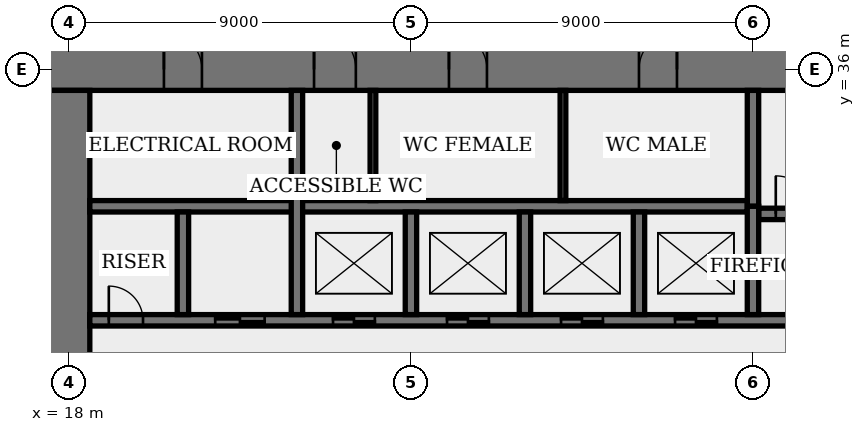
"""IFC4 building model, lengths in metres.
Left out: names, types, materials, properties, quantities, classifications, styles, units other than length and angle.
Written with IfcOpenShell. Run it as: python <this file> out.ifc"""

import sys

from ifc_helpers import new_model, si_unit, direction, frame, frame_2d, origin, place, context, subcontext, project, spatial, rectangle, extrude, element, fill, save


model = new_model("IFC4")
c1 = context("Model", 3, precision=1e-05, world=origin(), true_north=direction((0.0, 1.0)))
c2 = subcontext(c1, "Body", "Model", "MODEL_VIEW")
j1 = project(units=[si_unit("LENGTHUNIT", "METRE"), si_unit("PLANEANGLEUNIT", "RADIAN")], contexts=[c1])
p1 = place(None, origin())
s1 = spatial("IfcSite", under=j1, at=p1, CompositionType="ELEMENT")
p2 = place(p1, origin())
s2 = spatial("IfcBuilding", under=s1, at=p2, CompositionType="ELEMENT")
p3 = place(p2, origin())
s3 = spatial("IfcBuildingStorey", under=s2, at=p3, CompositionType="ELEMENT", Elevation=0.0)
p4 = place(p3, frame((45.55, 36.0, 0.0), z_axis=(0.0, 0.0, 1.0), x_axis=(-1.0, 0.0, 0.0)))
e1 = element("IfcWall", 1, at=p4, inside=s3, PredefinedType="SHEAR", context=c2, shape_type="SweptSolid", body=[
    extrude(rectangle(XDim=28.1, YDim=1.1, at=frame_2d((14.05, 0.0))), origin(), (0.0, 0.0, 1.0), 5.4),
])
p5 = place(p4, frame((11.55, 0.0, 0.0)))
e2 = element("IfcOpeningElement", 2, at=p5, cuts=e1, PredefinedType="OPENING", context=c2, shape_type="SweptSolid", body=[
    extrude(rectangle(XDim=1.0, YDim=2.4, at=frame_2d((0.5, 1.2))), frame((0.0, 0.56, 0.0), z_axis=(0.0, -1.0, 0.0), x_axis=(1.0, 0.0, 0.0)), (0.0, 0.0, 1.0), 1.12),
])
p6 = place(p4, frame((16.55, 0.0, 0.0)))
e3 = element("IfcOpeningElement", 3, at=p6, cuts=e1, PredefinedType="OPENING", context=c2, shape_type="SweptSolid", body=[
    extrude(rectangle(XDim=1.0, YDim=2.4, at=frame_2d((0.5, 1.2))), frame((0.0, 0.56, 0.0), z_axis=(0.0, -1.0, 0.0), x_axis=(1.0, 0.0, 0.0)), (0.0, 0.0, 1.0), 1.12),
])
p7 = place(p4, frame((20.0, 0.0, 0.0)))
e4 = element("IfcOpeningElement", 4, at=p7, cuts=e1, PredefinedType="OPENING", context=c2, shape_type="SweptSolid", body=[
    extrude(rectangle(XDim=1.1, YDim=2.4, at=frame_2d((0.55, 1.2))), frame((0.0, 0.56, 0.0), z_axis=(0.0, -1.0, 0.0), x_axis=(1.0, 0.0, 0.0)), (0.0, 0.0, 1.0), 1.12),
])
p8 = place(p4, frame((24.05, 0.0, 0.0)))
e5 = element("IfcOpeningElement", 5, at=p8, cuts=e1, PredefinedType="OPENING", context=c2, shape_type="SweptSolid", body=[
    extrude(rectangle(XDim=1.0, YDim=2.4, at=frame_2d((0.5, 1.2))), frame((0.0, 0.56, 0.0), z_axis=(0.0, -1.0, 0.0), x_axis=(1.0, 0.0, 0.0)), (0.0, 0.0, 1.0), 1.12),
])
p9 = place(p3, frame((18.0, 35.45, 0.0), z_axis=(0.0, 0.0, 1.0), x_axis=(0.0, -1.0, 0.0)))
e6 = element("IfcWall", 6, at=p9, inside=s3, PredefinedType="SHEAR", context=c2, shape_type="SweptSolid", body=[
    extrude(rectangle(XDim=16.9, YDim=1.1, at=frame_2d((8.45, 0.0))), origin(), (0.0, 0.0, 1.0), 5.4),
])
p10 = place(p9, frame((8.45, 0.0, 0.0)))
e7 = element("IfcOpeningElement", 7, at=p10, cuts=e6, PredefinedType="OPENING", context=c2, shape_type="SweptSolid", body=[
    extrude(rectangle(XDim=1.8, YDim=2.4, at=frame_2d((0.9, 1.2))), frame((0.0, 0.56, 0.0), z_axis=(0.0, -1.0, 0.0), x_axis=(1.0, 0.0, 0.0)), (0.0, 0.0, 1.0), 1.12),
])
p11 = place(p3, frame((36.15, 32.2, 0.0), z_axis=(0.0, 0.0, 1.0), x_axis=(1.0, 0.0, 0.0)))
e8 = element("IfcWall", 8, at=p11, inside=s3, PredefinedType="SHEAR", context=c2, shape_type="SweptSolid", body=[
    extrude(rectangle(XDim=8.3, YDim=0.3, at=frame_2d((4.15, 0.0))), origin(), (0.0, 0.0, 1.0), 5.4),
])
p12 = place(p11, frame((0.45, 0.0, 0.0)))
e9 = element("IfcOpeningElement", 9, at=p12, cuts=e8, PredefinedType="OPENING", context=c2, shape_type="SweptSolid", body=[
    extrude(rectangle(XDim=1.0, YDim=2.4, at=frame_2d((0.5, 1.2))), frame((0.0, 0.16, 0.0), z_axis=(0.0, -1.0, 0.0), x_axis=(1.0, 0.0, 0.0)), (0.0, 0.0, 1.0), 0.32),
])
p13 = place(p3, frame((36.0, 32.4, 0.0), z_axis=(0.0, 0.0, 1.0), x_axis=(0.0, 1.0, 0.0)))
e10 = element("IfcWall", 10, at=p13, inside=s3, PredefinedType="SHEAR", context=c2, shape_type="SweptSolid", body=[
    extrude(rectangle(XDim=3.05, YDim=0.3, at=frame_2d((1.525, 0.0))), origin(), (0.0, 0.0, 1.0), 5.4),
])
p14 = place(p3, frame((18.55, 29.4, 0.0), z_axis=(0.0, 0.0, 1.0), x_axis=(1.0, 0.0, 0.0)))
e11 = element("IfcWall", 11, at=p14, inside=s3, PredefinedType="SHEAR", context=c2, shape_type="SweptSolid", body=[
    extrude(rectangle(XDim=25.9, YDim=0.3, at=frame_2d((12.95, 0.0))), origin(), (0.0, 0.0, 1.0), 5.4),
])
p15 = place(p14, frame((19.95, 0.0, 0.0)))
e12 = element("IfcOpeningElement", 12, at=p15, cuts=e11, PredefinedType="OPENING", context=c2, shape_type="SweptSolid", body=[
    extrude(rectangle(XDim=1.0, YDim=2.4, at=frame_2d((0.5, 1.2))), frame((0.0, 0.16, 0.0), z_axis=(0.0, -1.0, 0.0), x_axis=(1.0, 0.0, 0.0)), (0.0, 0.0, 1.0), 0.32),
])
p16 = place(p14, frame((0.5, 0.0, 0.0)))
e13 = element("IfcOpeningElement", 13, at=p16, cuts=e11, PredefinedType="OPENING", context=c2, shape_type="SweptSolid", body=[
    extrude(rectangle(XDim=0.9, YDim=2.1, at=frame_2d((0.45, 1.05))), frame((0.0, 0.16, 0.0), z_axis=(0.0, -1.0, 0.0), x_axis=(1.0, 0.0, 0.0)), (0.0, 0.0, 1.0), 0.32),
])
p17 = place(p14, frame((15.4, 0.0, 0.0)))
e14 = element("IfcOpeningElement", 14, at=p17, cuts=e11, PredefinedType="OPENING", context=c2, shape_type="SweptSolid", body=[
    extrude(rectangle(XDim=1.1, YDim=2.4, at=frame_2d((0.55, 1.2))), frame((0.0, 0.16, 0.0), z_axis=(0.0, -1.0, 0.0), x_axis=(1.0, 0.0, 0.0)), (0.0, 0.0, 1.0), 0.32),
])
p18 = place(p14, frame((12.4, 0.0, 0.0)))
e15 = element("IfcOpeningElement", 15, at=p18, cuts=e11, PredefinedType="OPENING", context=c2, shape_type="SweptSolid", body=[
    extrude(rectangle(XDim=1.1, YDim=2.4, at=frame_2d((0.55, 1.2))), frame((0.0, 0.16, 0.0), z_axis=(0.0, -1.0, 0.0), x_axis=(1.0, 0.0, 0.0)), (0.0, 0.0, 1.0), 0.32),
])
p19 = place(p14, frame((9.4, 0.0, 0.0)))
e16 = element("IfcOpeningElement", 16, at=p19, cuts=e11, PredefinedType="OPENING", context=c2, shape_type="SweptSolid", body=[
    extrude(rectangle(XDim=1.1, YDim=2.4, at=frame_2d((0.55, 1.2))), frame((0.0, 0.16, 0.0), z_axis=(0.0, -1.0, 0.0), x_axis=(1.0, 0.0, 0.0)), (0.0, 0.0, 1.0), 0.32),
])
p20 = place(p14, frame((6.4, 0.0, 0.0)))
e17 = element("IfcOpeningElement", 17, at=p20, cuts=e11, PredefinedType="OPENING", context=c2, shape_type="SweptSolid", body=[
    extrude(rectangle(XDim=1.1, YDim=2.4, at=frame_2d((0.55, 1.2))), frame((0.0, 0.16, 0.0), z_axis=(0.0, -1.0, 0.0), x_axis=(1.0, 0.0, 0.0)), (0.0, 0.0, 1.0), 0.32),
])
p21 = place(p14, frame((3.3, 0.0, 0.0)))
e18 = element("IfcOpeningElement", 18, at=p21, cuts=e11, PredefinedType="OPENING", context=c2, shape_type="SweptSolid", body=[
    extrude(rectangle(XDim=1.3, YDim=2.4, at=frame_2d((0.65, 1.2))), frame((0.0, 0.16, 0.0), z_axis=(0.0, -1.0, 0.0), x_axis=(1.0, 0.0, 0.0)), (0.0, 0.0, 1.0), 0.32),
])
p22 = place(p3, frame((18.55, 32.4, 0.0), z_axis=(0.0, 0.0, 1.0), x_axis=(1.0, 0.0, 0.0)))
e19 = element("IfcWall", 19, at=p22, inside=s3, PredefinedType="SHEAR", context=c2, shape_type="SweptSolid", body=[
    extrude(rectangle(XDim=17.3, YDim=0.3, at=frame_2d((8.65, 0.0))), origin(), (0.0, 0.0, 1.0), 5.4),
])
for number, where, z_axis, x_axis in (
    (20, (33.0, 29.55, 0.0), (0.0, 0.0, 1.0), (0.0, 1.0, 0.0)),
    (21, (30.0, 29.55, 0.0), (0.0, 0.0, 1.0), (0.0, 1.0, 0.0)),
    (22, (27.0, 29.55, 0.0), (0.0, 0.0, 1.0), (0.0, 1.0, 0.0)),
):
    element("IfcWall", number, at=place(p3, frame(where, z_axis=z_axis, x_axis=x_axis)), inside=s3, PredefinedType="SHEAR", context=c2, shape_type="SweptSolid", body=[
        extrude(rectangle(XDim=2.7, YDim=0.3, at=frame_2d((1.35, 0.0))), origin(), (0.0, 0.0, 1.0), 5.4),
    ])
p23 = place(p3, frame((24.0, 29.55, 0.0), z_axis=(0.0, 0.0, 1.0), x_axis=(0.0, 1.0, 0.0)))
e23 = element("IfcWall", 23, at=p23, inside=s3, PredefinedType="SHEAR", context=c2, shape_type="SweptSolid", body=[
    extrude(rectangle(XDim=5.9, YDim=0.3, at=frame_2d((2.95, 0.0))), origin(), (0.0, 0.0, 1.0), 5.4),
])
p24 = place(p3, frame((21.0, 29.55, 0.0), z_axis=(0.0, 0.0, 1.0), x_axis=(0.0, 1.0, 0.0)))
e24 = element("IfcWall", 24, at=p24, inside=s3, PredefinedType="SHEAR", context=c2, shape_type="SweptSolid", body=[
    extrude(rectangle(XDim=2.7, YDim=0.3, at=frame_2d((1.35, 0.0))), origin(), (0.0, 0.0, 1.0), 5.4),
])
p25 = place(p3, frame((36.0, 29.55, 0.0), z_axis=(0.0, 0.0, 1.0), x_axis=(0.0, 1.0, 0.0)))
e25 = element("IfcWall", 25, at=p25, inside=s3, PredefinedType="SHEAR", context=c2, shape_type="SweptSolid", body=[
    extrude(rectangle(XDim=2.85, YDim=0.3, at=frame_2d((1.425, 0.0))), origin(), (0.0, 0.0, 1.0), 5.4),
])
for number, where, z_axis, x_axis in (
    (26, (31.0, 32.55, 0.0), (0.0, 0.0, 1.0), (0.0, 1.0, 0.0)),
    (27, (26.0, 32.55, 0.0), (0.0, 0.0, 1.0), (0.0, 1.0, 0.0)),
):
    element("IfcWall", number, at=place(p3, frame(where, z_axis=z_axis, x_axis=x_axis)), inside=s3, PredefinedType="PARTITIONING", context=c2, shape_type="SweptSolid", body=[
        extrude(rectangle(XDim=2.9, YDim=0.15, at=frame_2d((1.45, 0.0))), origin(), (0.0, 0.0, 1.0), 5.1),
    ])
p26 = place(p5, origin())
e28 = element("IfcDoor", 28, at=p26, inside=s3, OperationType="SINGLE_SWING_LEFT", PredefinedType="DOOR", context=c2, shape_type="SweptSolid", body=[
    extrude(rectangle(XDim=1.0, YDim=2.4, at=frame_2d((0.5, 1.2))), frame((0.0, 0.025, 0.0), z_axis=(0.0, -1.0, 0.0), x_axis=(1.0, 0.0, 0.0)), (0.0, 0.0, 1.0), 0.05),
    extrude(rectangle(XDim=0.04, YDim=2.4, at=frame_2d((0.02, 1.2))), frame((0.0, 0.4, 0.0), z_axis=(0.0, -1.0, 0.0), x_axis=(1.0, 0.0, 0.0)), (0.0, 0.0, 1.0), 0.8),
    extrude(rectangle(XDim=0.04, YDim=2.4, at=frame_2d((0.98, 1.2))), frame((0.0, 0.4, 0.0), z_axis=(0.0, -1.0, 0.0), x_axis=(1.0, 0.0, 0.0)), (0.0, 0.0, 1.0), 0.8),
    extrude(rectangle(XDim=1.0, YDim=0.04, at=frame_2d((0.5, 2.38))), frame((0.0, 0.4, 0.0), z_axis=(0.0, -1.0, 0.0), x_axis=(1.0, 0.0, 0.0)), (0.0, 0.0, 1.0), 0.8),
])
fill(e2, e28)
p27 = place(p6, origin())
e29 = element("IfcDoor", 29, at=p27, inside=s3, OperationType="SINGLE_SWING_RIGHT", PredefinedType="DOOR", context=c2, shape_type="SweptSolid", body=[
    extrude(rectangle(XDim=1.0, YDim=2.4, at=frame_2d((0.5, 1.2))), frame((0.0, 0.025, 0.0), z_axis=(0.0, -1.0, 0.0), x_axis=(1.0, 0.0, 0.0)), (0.0, 0.0, 1.0), 0.05),
    extrude(rectangle(XDim=0.04, YDim=2.4, at=frame_2d((0.02, 1.2))), frame((0.0, 0.4, 0.0), z_axis=(0.0, -1.0, 0.0), x_axis=(1.0, 0.0, 0.0)), (0.0, 0.0, 1.0), 0.8),
    extrude(rectangle(XDim=0.04, YDim=2.4, at=frame_2d((0.98, 1.2))), frame((0.0, 0.4, 0.0), z_axis=(0.0, -1.0, 0.0), x_axis=(1.0, 0.0, 0.0)), (0.0, 0.0, 1.0), 0.8),
    extrude(rectangle(XDim=1.0, YDim=0.04, at=frame_2d((0.5, 2.38))), frame((0.0, 0.4, 0.0), z_axis=(0.0, -1.0, 0.0), x_axis=(1.0, 0.0, 0.0)), (0.0, 0.0, 1.0), 0.8),
])
fill(e3, e29)
p28 = place(p7, origin())
e30 = element("IfcDoor", 30, at=p28, inside=s3, OperationType="SINGLE_SWING_RIGHT", PredefinedType="DOOR", context=c2, shape_type="SweptSolid", body=[
    extrude(rectangle(XDim=1.1, YDim=2.4, at=frame_2d((0.55, 1.2))), frame((0.0, 0.025, 0.0), z_axis=(0.0, -1.0, 0.0), x_axis=(1.0, 0.0, 0.0)), (0.0, 0.0, 1.0), 0.05),
    extrude(rectangle(XDim=0.04, YDim=2.4, at=frame_2d((0.02, 1.2))), frame((0.0, 0.44, 0.0), z_axis=(0.0, -1.0, 0.0), x_axis=(1.0, 0.0, 0.0)), (0.0, 0.0, 1.0), 0.88),
    extrude(rectangle(XDim=0.04, YDim=2.4, at=frame_2d((1.08, 1.2))), frame((0.0, 0.44, 0.0), z_axis=(0.0, -1.0, 0.0), x_axis=(1.0, 0.0, 0.0)), (0.0, 0.0, 1.0), 0.88),
    extrude(rectangle(XDim=1.1, YDim=0.04, at=frame_2d((0.55, 2.38))), frame((0.0, 0.44, 0.0), z_axis=(0.0, -1.0, 0.0), x_axis=(1.0, 0.0, 0.0)), (0.0, 0.0, 1.0), 0.88),
])
fill(e4, e30)
p29 = place(p8, origin())
e31 = element("IfcDoor", 31, at=p29, inside=s3, OperationType="SINGLE_SWING_RIGHT", PredefinedType="DOOR", context=c2, shape_type="SweptSolid", body=[
    extrude(rectangle(XDim=1.0, YDim=2.4, at=frame_2d((0.5, 1.2))), frame((0.0, 0.025, 0.0), z_axis=(0.0, -1.0, 0.0), x_axis=(1.0, 0.0, 0.0)), (0.0, 0.0, 1.0), 0.05),
    extrude(rectangle(XDim=0.04, YDim=2.4, at=frame_2d((0.02, 1.2))), frame((0.0, 0.4, 0.0), z_axis=(0.0, -1.0, 0.0), x_axis=(1.0, 0.0, 0.0)), (0.0, 0.0, 1.0), 0.8),
    extrude(rectangle(XDim=0.04, YDim=2.4, at=frame_2d((0.98, 1.2))), frame((0.0, 0.4, 0.0), z_axis=(0.0, -1.0, 0.0), x_axis=(1.0, 0.0, 0.0)), (0.0, 0.0, 1.0), 0.8),
    extrude(rectangle(XDim=1.0, YDim=0.04, at=frame_2d((0.5, 2.38))), frame((0.0, 0.4, 0.0), z_axis=(0.0, -1.0, 0.0), x_axis=(1.0, 0.0, 0.0)), (0.0, 0.0, 1.0), 0.8),
])
fill(e5, e31)
p30 = place(p12, origin())
e32 = element("IfcDoor", 32, at=p30, inside=s3, OperationType="SINGLE_SWING_RIGHT", PredefinedType="DOOR", context=c2, shape_type="SweptSolid", body=[
    extrude(rectangle(XDim=1.0, YDim=2.4, at=frame_2d((0.5, 1.2))), frame((0.0, 0.03, 0.0), z_axis=(0.0, -1.0, 0.0), x_axis=(1.0, 0.0, 0.0)), (0.0, 0.0, 1.0), 0.06),
])
fill(e9, e32)
p31 = place(p16, origin())
e33 = element("IfcDoor", 33, at=p31, inside=s3, OperationType="SINGLE_SWING_RIGHT", PredefinedType="DOOR", context=c2, shape_type="SweptSolid", body=[
    extrude(rectangle(XDim=0.9, YDim=2.1, at=frame_2d((0.45, 1.05))), frame((0.0, 0.03, 0.0), z_axis=(0.0, -1.0, 0.0), x_axis=(1.0, 0.0, 0.0)), (0.0, 0.0, 1.0), 0.06),
])
fill(e13, e33)
p32 = place(p17, origin())
e34 = element("IfcDoor", 34, at=p32, inside=s3, OperationType="DOUBLE_DOOR_SLIDING", PredefinedType="DOOR", context=c2, shape_type="SweptSolid", body=[
    extrude(rectangle(XDim=1.1, YDim=2.4, at=frame_2d((0.55, 1.2))), frame((0.0, 0.02, 0.0), z_axis=(0.0, -1.0, 0.0), x_axis=(1.0, 0.0, 0.0)), (0.0, 0.0, 1.0), 0.04),
])
fill(e14, e34)
p33 = place(p18, origin())
e35 = element("IfcDoor", 35, at=p33, inside=s3, OperationType="DOUBLE_DOOR_SLIDING", PredefinedType="DOOR", context=c2, shape_type="SweptSolid", body=[
    extrude(rectangle(XDim=1.1, YDim=2.4, at=frame_2d((0.55, 1.2))), frame((0.0, 0.02, 0.0), z_axis=(0.0, -1.0, 0.0), x_axis=(1.0, 0.0, 0.0)), (0.0, 0.0, 1.0), 0.04),
])
fill(e15, e35)
p34 = place(p19, origin())
e36 = element("IfcDoor", 36, at=p34, inside=s3, OperationType="DOUBLE_DOOR_SLIDING", PredefinedType="DOOR", context=c2, shape_type="SweptSolid", body=[
    extrude(rectangle(XDim=1.1, YDim=2.4, at=frame_2d((0.55, 1.2))), frame((0.0, 0.02, 0.0), z_axis=(0.0, -1.0, 0.0), x_axis=(1.0, 0.0, 0.0)), (0.0, 0.0, 1.0), 0.04),
])
fill(e16, e36)
p35 = place(p20, origin())
e37 = element("IfcDoor", 37, at=p35, inside=s3, OperationType="DOUBLE_DOOR_SLIDING", PredefinedType="DOOR", context=c2, shape_type="SweptSolid", body=[
    extrude(rectangle(XDim=1.1, YDim=2.4, at=frame_2d((0.55, 1.2))), frame((0.0, 0.02, 0.0), z_axis=(0.0, -1.0, 0.0), x_axis=(1.0, 0.0, 0.0)), (0.0, 0.0, 1.0), 0.04),
])
fill(e17, e37)
p36 = place(p21, origin())
e38 = element("IfcDoor", 38, at=p36, inside=s3, OperationType="DOUBLE_DOOR_SLIDING", PredefinedType="DOOR", context=c2, shape_type="SweptSolid", body=[
    extrude(rectangle(XDim=1.3, YDim=2.4, at=frame_2d((0.65, 1.2))), frame((0.0, 0.02, 0.0), z_axis=(0.0, -1.0, 0.0), x_axis=(1.0, 0.0, 0.0)), (0.0, 0.0, 1.0), 0.04),
])
fill(e18, e38)
save(model, sys.argv[1])
